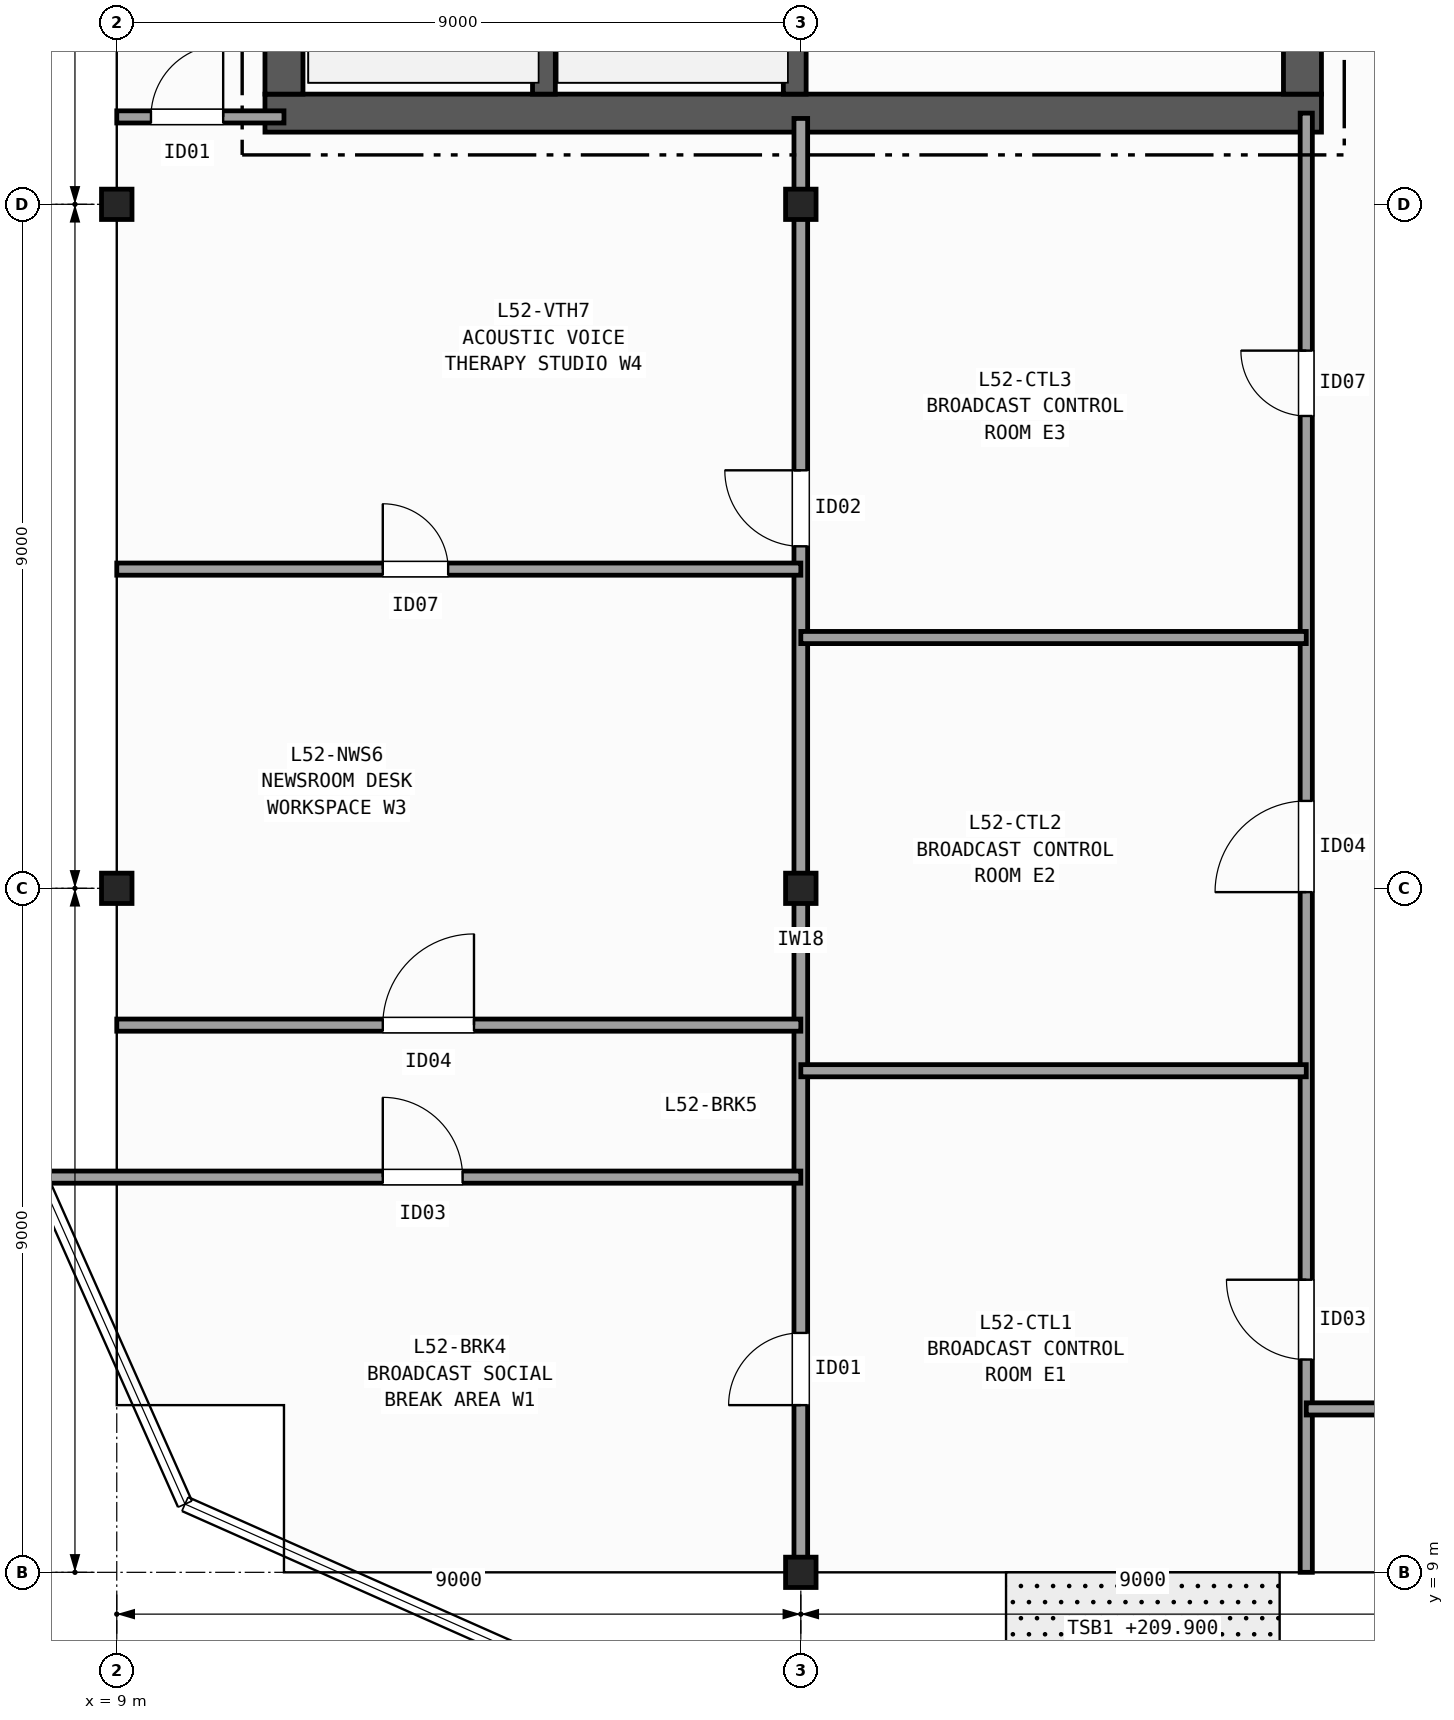
"""IFC4 building model, lengths in metres.
Left out: names, types, materials, properties, quantities, classifications, styles, units other than length and angle.
Written with IfcOpenShell. Run it as: python <this file> out.ifc"""

import sys

from ifc_helpers import new_model, si_unit, direction, frame, frame_2d, origin, origin_2d, place, context, subcontext, project, spatial, rectangle, i_section, extrude, element, fill, save


model = new_model("IFC4")
c1 = context("Model", 3, precision=1e-05, world=origin(), true_north=direction((0.0, 1.0)))
c2 = subcontext(c1, "Body", "Model", "MODEL_VIEW")
j1 = project(units=[si_unit("LENGTHUNIT", "METRE"), si_unit("PLANEANGLEUNIT", "RADIAN")], contexts=[c1])
p1 = place(None, origin())
s1 = spatial("IfcSite", under=j1, at=p1, CompositionType="ELEMENT")
p2 = place(p1, origin())
s2 = spatial("IfcBuilding", under=s1, at=p2, CompositionType="ELEMENT")
p3 = place(p2, frame((0.0, 0.0, 209.9)))
s3 = spatial("IfcBuildingStorey", under=s2, at=p3, CompositionType="ELEMENT", Elevation=209.9)
for number, where, z_axis, x_axis in (
    (1, (9.0, 18.0, 0.0), (0.0, 0.0, 1.0), (1.0, 0.0, 0.0)),
    (2, (9.0, 27.0, 0.0), (0.0, 0.0, 1.0), (1.0, 0.0, 0.0)),
    (3, (18.0, 9.0, 0.0), (0.0, 0.0, 1.0), (1.0, 0.0, 0.0)),
    (4, (18.0, 18.0, 0.0), (0.0, 0.0, 1.0), (1.0, 0.0, 0.0)),
    (5, (18.0, 27.0, 0.0), (0.0, 0.0, 1.0), (1.0, 0.0, 0.0)),
):
    element("IfcColumn", number, at=place(p3, frame(where, z_axis=z_axis, x_axis=x_axis)), inside=s3, PredefinedType="COLUMN", context=c2, shape_type="SweptSolid", body=[
        extrude(i_section(OverallWidth=0.401, OverallDepth=0.399, WebThickness=0.025, FlangeThickness=0.04, FilletRadius=0.015, at=origin_2d()), origin(), (0.0, 0.0, 1.0), 3.7),
    ])
p4 = place(p3, frame((10.95, 28.2, 0.0), z_axis=(0.0, 0.0, 1.0), x_axis=(1.0, 0.0, 0.0)))
e6 = element("IfcWall", 6, at=p4, inside=s3, PredefinedType="SHEAR", context=c2, shape_type="SweptSolid", body=[
    extrude(rectangle(XDim=13.9, YDim=0.5, at=frame_2d((6.95, 0.0))), origin(), (0.0, 0.0, 1.0), 3.42),
])
p5 = place(p3, frame((11.2, 42.15, 0.0), z_axis=(0.0, 0.0, 1.0), x_axis=(0.0, -1.0, 0.0)))
e7 = element("IfcWall", 7, at=p5, inside=s3, PredefinedType="SHEAR", context=c2, shape_type="SweptSolid", body=[
    extrude(rectangle(XDim=13.7, YDim=0.5, at=frame_2d((6.85, 0.0))), origin(), (0.0, 0.0, 1.0), 3.42),
])
p6 = place(p3, frame((24.6, 28.45, 0.0), z_axis=(0.0, 0.0, 1.0), x_axis=(0.0, 1.0, 0.0)))
e8 = element("IfcWall", 8, at=p6, inside=s3, PredefinedType="SHEAR", context=c2, shape_type="SweptSolid", body=[
    extrude(rectangle(XDim=13.7, YDim=0.5, at=frame_2d((6.85, 0.0))), origin(), (0.0, 0.0, 1.0), 3.42),
])
p7 = place(p6, frame((3.35, 0.0, 0.0)))
e9 = element("IfcOpeningElement", 9, at=p7, cuts=e8, PredefinedType="OPENING", context=c2, shape_type="SweptSolid", body=[
    extrude(rectangle(XDim=1.5, YDim=2.2, at=frame_2d((0.75, 1.1))), frame((0.0, 0.26, 0.0), z_axis=(0.0, -1.0, 0.0), x_axis=(1.0, 0.0, 0.0)), (0.0, 0.0, 1.0), 0.52),
])
p8 = place(p6, frame((9.95, 0.0, 0.0)))
e10 = element("IfcOpeningElement", 10, at=p8, cuts=e8, PredefinedType="OPENING", context=c2, shape_type="SweptSolid", body=[
    extrude(rectangle(XDim=0.9, YDim=2.1, at=frame_2d((0.45, 1.05))), frame((0.0, 0.26, 0.0), z_axis=(0.0, -1.0, 0.0), x_axis=(1.0, 0.0, 0.0)), (0.0, 0.0, 1.0), 0.52),
])
p9 = place(p3, frame((14.62, 28.45, 0.0), z_axis=(0.0, 0.0, 1.0), x_axis=(0.0, 1.0, 0.0)))
e11 = element("IfcWall", 11, at=p9, inside=s3, PredefinedType="SHEAR", context=c2, shape_type="SweptSolid", body=[
    extrude(rectangle(XDim=9.0, YDim=0.3, at=frame_2d((4.5, 0.0))), origin(), (0.0, 0.0, 1.0), 3.42),
])
p10 = place(p3, frame((17.92, 42.15, 0.0), z_axis=(0.0, 0.0, 1.0), x_axis=(0.0, -1.0, 0.0)))
e12 = element("IfcWall", 12, at=p10, inside=s3, PredefinedType="SHEAR", context=c2, shape_type="SweptSolid", body=[
    extrude(rectangle(XDim=13.7, YDim=0.3, at=frame_2d((6.85, 0.0))), origin(), (0.0, 0.0, 1.0), 3.42),
])
p11 = place(p10, frame((1.975, 0.0, 0.0)))
e13 = element("IfcOpeningElement", 13, at=p11, cuts=e12, PredefinedType="OPENING", context=c2, shape_type="SweptSolid", body=[
    extrude(rectangle(XDim=1.15, YDim=2.15, at=frame_2d((0.575, 1.075))), frame((0.0, 0.16, 0.0), z_axis=(0.0, -1.0, 0.0), x_axis=(1.0, 0.0, 0.0)), (0.0, 0.0, 1.0), 0.32),
])
p12 = place(p3, frame((9.0, 28.15, 0.0), z_axis=(0.0, 0.0, 1.0), x_axis=(1.0, 0.0, 0.0)))
e14 = element("IfcWall", 14, at=p12, inside=s3, PredefinedType="PARTITIONING", context=c2, shape_type="SweptSolid", body=[
    extrude(rectangle(XDim=2.2, YDim=0.16, at=frame_2d((1.1, 0.0))), origin(), (0.0, 0.0, 1.0), 2.707),
])
p13 = place(p12, frame((0.45, 0.0, 0.0)))
e15 = element("IfcOpeningElement", 15, at=p13, cuts=e14, PredefinedType="OPENING", context=c2, shape_type="SweptSolid", body=[
    extrude(rectangle(XDim=0.95, YDim=2.1, at=frame_2d((0.475, 1.05))), frame((0.0, 0.09, 0.0), z_axis=(0.0, -1.0, 0.0), x_axis=(1.0, 0.0, 0.0)), (0.0, 0.0, 1.0), 0.18),
])
p14 = place(p3, frame((24.65, 9.0, 0.0), z_axis=(0.0, 0.0, 1.0), x_axis=(0.0, 1.0, 0.0)))
e16 = element("IfcWall", 16, at=p14, inside=s3, PredefinedType="PARTITIONING", context=c2, shape_type="SweptSolid", body=[
    extrude(rectangle(XDim=19.2, YDim=0.16, at=frame_2d((9.6, 0.0))), origin(), (0.0, 0.0, 1.0), 2.707),
])
p15 = place(p14, frame((2.8, 0.0, 0.0)))
e17 = element("IfcOpeningElement", 17, at=p15, cuts=e16, PredefinedType="OPENING", context=c2, shape_type="SweptSolid", body=[
    extrude(rectangle(XDim=1.05, YDim=2.15, at=frame_2d((0.525, 1.075))), frame((0.0, 0.09, 0.0), z_axis=(0.0, -1.0, 0.0), x_axis=(1.0, 0.0, 0.0)), (0.0, 0.0, 1.0), 0.18),
])
p16 = place(p14, frame((8.95, 0.0, 0.0)))
e18 = element("IfcOpeningElement", 18, at=p16, cuts=e16, PredefinedType="OPENING", context=c2, shape_type="SweptSolid", body=[
    extrude(rectangle(XDim=1.2, YDim=2.15, at=frame_2d((0.6, 1.075))), frame((0.0, 0.09, 0.0), z_axis=(0.0, -1.0, 0.0), x_axis=(1.0, 0.0, 0.0)), (0.0, 0.0, 1.0), 0.18),
])
p17 = place(p14, frame((15.215, 0.0, 0.0)))
e19 = element("IfcOpeningElement", 19, at=p17, cuts=e16, PredefinedType="OPENING", context=c2, shape_type="SweptSolid", body=[
    extrude(rectangle(XDim=0.86, YDim=2.05, at=frame_2d((0.43, 1.025))), frame((0.0, 0.09, 0.0), z_axis=(0.0, -1.0, 0.0), x_axis=(1.0, 0.0, 0.0)), (0.0, 0.0, 1.0), 0.18),
])
p18 = place(p3, frame((18.0, 9.0, 0.0), z_axis=(0.0, 0.0, 1.0), x_axis=(0.0, 1.0, 0.0)))
e20 = element("IfcWall", 20, at=p18, inside=s3, PredefinedType="PARTITIONING", context=c2, shape_type="SweptSolid", body=[
    extrude(rectangle(XDim=19.13, YDim=0.18, at=frame_2d((9.565, 0.0))), origin(), (0.0, 0.0, 1.0), 2.707),
])
p19 = place(p18, frame((2.2, 0.0, 0.0)))
e21 = element("IfcOpeningElement", 21, at=p19, cuts=e20, PredefinedType="OPENING", context=c2, shape_type="SweptSolid", body=[
    extrude(rectangle(XDim=0.95, YDim=2.1, at=frame_2d((0.475, 1.05))), frame((0.0, 0.1, 0.0), z_axis=(0.0, -1.0, 0.0), x_axis=(1.0, 0.0, 0.0)), (0.0, 0.0, 1.0), 0.2),
])
p20 = place(p18, frame((13.5, 0.0, 0.0)))
e22 = element("IfcOpeningElement", 22, at=p20, cuts=e20, PredefinedType="OPENING", context=c2, shape_type="SweptSolid", body=[
    extrude(rectangle(XDim=1.0, YDim=2.1, at=frame_2d((0.5, 1.05))), frame((0.0, 0.1, 0.0), z_axis=(0.0, -1.0, 0.0), x_axis=(1.0, 0.0, 0.0)), (0.0, 0.0, 1.0), 0.2),
])
for number, where, z_axis, x_axis in (
    (23, (18.0, 15.6, 0.0), (0.0, 0.0, 1.0), (1.0, 0.0, 0.0)),
    (24, (18.0, 21.3, 0.0), (0.0, 0.0, 1.0), (1.0, 0.0, 0.0)),
):
    element("IfcWall", number, at=place(p3, frame(where, z_axis=z_axis, x_axis=x_axis)), inside=s3, PredefinedType="PARTITIONING", context=c2, shape_type="SweptSolid", body=[
        extrude(rectangle(XDim=6.65, YDim=0.16, at=frame_2d((3.325, 0.0))), origin(), (0.0, 0.0, 1.0), 2.792),
    ])
p21 = place(p3, frame((7.987, 14.2, 0.0), z_axis=(0.0, 0.0, 1.0), x_axis=(1.0, 0.0, 0.0)))
e25 = element("IfcWall", 25, at=p21, inside=s3, PredefinedType="PARTITIONING", context=c2, shape_type="SweptSolid", body=[
    extrude(rectangle(XDim=10.013, YDim=0.16, at=frame_2d((5.006, 0.0))), origin(), (0.0, 0.0, 1.0), 2.792),
])
p22 = place(p21, frame((4.513, 0.0, 0.0)))
e26 = element("IfcOpeningElement", 26, at=p22, cuts=e25, PredefinedType="OPENING", context=c2, shape_type="SweptSolid", body=[
    extrude(rectangle(XDim=1.05, YDim=2.15, at=frame_2d((0.525, 1.075))), frame((0.0, 0.09, 0.0), z_axis=(0.0, -1.0, 0.0), x_axis=(1.0, 0.0, 0.0)), (0.0, 0.0, 1.0), 0.18),
])
p23 = place(p3, frame((9.0, 16.2, 0.0), z_axis=(0.0, 0.0, 1.0), x_axis=(1.0, 0.0, 0.0)))
e27 = element("IfcWall", 27, at=p23, inside=s3, PredefinedType="PARTITIONING", context=c2, shape_type="SweptSolid", body=[
    extrude(rectangle(XDim=9.0, YDim=0.16, at=frame_2d((4.5, 0.0))), origin(), (0.0, 0.0, 1.0), 2.792),
])
p24 = place(p23, frame((3.5, 0.0, 0.0)))
e28 = element("IfcOpeningElement", 28, at=p24, cuts=e27, PredefinedType="OPENING", context=c2, shape_type="SweptSolid", body=[
    extrude(rectangle(XDim=1.2, YDim=2.15, at=frame_2d((0.6, 1.075))), frame((0.0, 0.09, 0.0), z_axis=(0.0, -1.0, 0.0), x_axis=(1.0, 0.0, 0.0)), (0.0, 0.0, 1.0), 0.18),
])
p25 = place(p3, frame((9.0, 22.2, 0.0), z_axis=(0.0, 0.0, 1.0), x_axis=(1.0, 0.0, 0.0)))
e29 = element("IfcWall", 29, at=p25, inside=s3, PredefinedType="PARTITIONING", context=c2, shape_type="SweptSolid", body=[
    extrude(rectangle(XDim=9.0, YDim=0.16, at=frame_2d((4.5, 0.0))), origin(), (0.0, 0.0, 1.0), 2.707),
])
p26 = place(p25, frame((3.5, 0.0, 0.0)))
e30 = element("IfcOpeningElement", 30, at=p26, cuts=e29, PredefinedType="OPENING", context=c2, shape_type="SweptSolid", body=[
    extrude(rectangle(XDim=0.86, YDim=2.05, at=frame_2d((0.43, 1.025))), frame((0.0, 0.09, 0.0), z_axis=(0.0, -1.0, 0.0), x_axis=(1.0, 0.0, 0.0)), (0.0, 0.0, 1.0), 0.18),
])
p27 = place(p3, frame((24.65, 11.15, 0.0), z_axis=(0.0, 0.0, 1.0), x_axis=(1.0, 0.0, 0.0)))
e31 = element("IfcWall", 31, at=p27, inside=s3, PredefinedType="PARTITIONING", context=c2, shape_type="SweptSolid", body=[
    extrude(rectangle(XDim=4.75, YDim=0.16, at=frame_2d((2.375, 0.0))), origin(), (0.0, 0.0, 1.0), 2.792),
])
p28 = place(p27, frame((1.2, 0.0, 0.0)))
e32 = element("IfcOpeningElement", 32, at=p28, cuts=e31, PredefinedType="OPENING", context=c2, shape_type="SweptSolid", body=[
    extrude(rectangle(XDim=0.95, YDim=2.1, at=frame_2d((0.475, 1.05))), frame((0.0, 0.09, 0.0), z_axis=(0.0, -1.0, 0.0), x_axis=(1.0, 0.0, 0.0)), (0.0, 0.0, 1.0), 0.18),
])
p29 = place(p13, origin())
e33 = element("IfcDoor", 33, at=p29, inside=s3, OperationType="SINGLE_SWING_RIGHT", PredefinedType="DOOR", context=c2, shape_type="SweptSolid", body=[
    extrude(rectangle(XDim=0.95, YDim=2.1, at=frame_2d((0.475, 1.05))), frame((0.0, 0.025, 0.0), z_axis=(0.0, -1.0, 0.0), x_axis=(1.0, 0.0, 0.0)), (0.0, 0.0, 1.0), 0.05),
])
fill(e15, e33)
p30 = place(p15, origin())
e34 = element("IfcDoor", 34, at=p30, inside=s3, OperationType="SINGLE_SWING_RIGHT", PredefinedType="DOOR", context=c2, shape_type="SweptSolid", body=[
    extrude(rectangle(XDim=1.05, YDim=2.15, at=frame_2d((0.525, 1.075))), frame((0.0, 0.025, 0.0), z_axis=(0.0, -1.0, 0.0), x_axis=(1.0, 0.0, 0.0)), (0.0, 0.0, 1.0), 0.05),
])
fill(e17, e34)
p31 = place(p16, origin())
e35 = element("IfcDoor", 35, at=p31, inside=s3, OperationType="SINGLE_SWING_LEFT", PredefinedType="DOOR", context=c2, shape_type="SweptSolid", body=[
    extrude(rectangle(XDim=1.2, YDim=2.15, at=frame_2d((0.6, 1.075))), frame((0.0, 0.025, 0.0), z_axis=(0.0, -1.0, 0.0), x_axis=(1.0, 0.0, 0.0)), (0.0, 0.0, 1.0), 0.05),
])
fill(e18, e35)
p32 = place(p17, origin())
e36 = element("IfcDoor", 36, at=p32, inside=s3, OperationType="SINGLE_SWING_RIGHT", PredefinedType="DOOR", context=c2, shape_type="SweptSolid", body=[
    extrude(rectangle(XDim=0.86, YDim=2.05, at=frame_2d((0.43, 1.025))), frame((0.0, 0.025, 0.0), z_axis=(0.0, -1.0, 0.0), x_axis=(1.0, 0.0, 0.0)), (0.0, 0.0, 1.0), 0.05),
])
fill(e19, e36)
p33 = place(p19, origin())
e37 = element("IfcDoor", 37, at=p33, inside=s3, OperationType="SINGLE_SWING_LEFT", PredefinedType="DOOR", context=c2, shape_type="SweptSolid", body=[
    extrude(rectangle(XDim=0.95, YDim=2.1, at=frame_2d((0.475, 1.05))), frame((0.0, 0.025, 0.0), z_axis=(0.0, -1.0, 0.0), x_axis=(1.0, 0.0, 0.0)), (0.0, 0.0, 1.0), 0.05),
])
fill(e21, e37)
p34 = place(p20, origin())
e38 = element("IfcDoor", 38, at=p34, inside=s3, OperationType="SINGLE_SWING_RIGHT", PredefinedType="DOOR", context=c2, shape_type="SweptSolid", body=[
    extrude(rectangle(XDim=1.0, YDim=2.1, at=frame_2d((0.5, 1.05))), frame((0.0, 0.025, 0.0), z_axis=(0.0, -1.0, 0.0), x_axis=(1.0, 0.0, 0.0)), (0.0, 0.0, 1.0), 0.05),
])
fill(e22, e38)
p35 = place(p22, origin())
e39 = element("IfcDoor", 39, at=p35, inside=s3, OperationType="SINGLE_SWING_LEFT", PredefinedType="DOOR", context=c2, shape_type="SweptSolid", body=[
    extrude(rectangle(XDim=1.05, YDim=2.15, at=frame_2d((0.525, 1.075))), frame((0.0, 0.025, 0.0), z_axis=(0.0, -1.0, 0.0), x_axis=(1.0, 0.0, 0.0)), (0.0, 0.0, 1.0), 0.05),
])
fill(e26, e39)
p36 = place(p24, origin())
e40 = element("IfcDoor", 40, at=p36, inside=s3, OperationType="SINGLE_SWING_RIGHT", PredefinedType="DOOR", context=c2, shape_type="SweptSolid", body=[
    extrude(rectangle(XDim=1.2, YDim=2.15, at=frame_2d((0.6, 1.075))), frame((0.0, 0.025, 0.0), z_axis=(0.0, -1.0, 0.0), x_axis=(1.0, 0.0, 0.0)), (0.0, 0.0, 1.0), 0.05),
])
fill(e28, e40)
p37 = place(p26, origin())
e41 = element("IfcDoor", 41, at=p37, inside=s3, OperationType="SINGLE_SWING_LEFT", PredefinedType="DOOR", context=c2, shape_type="SweptSolid", body=[
    extrude(rectangle(XDim=0.86, YDim=2.05, at=frame_2d((0.43, 1.025))), frame((0.0, 0.025, 0.0), z_axis=(0.0, -1.0, 0.0), x_axis=(1.0, 0.0, 0.0)), (0.0, 0.0, 1.0), 0.05),
])
fill(e30, e41)
save(model, sys.argv[1])
